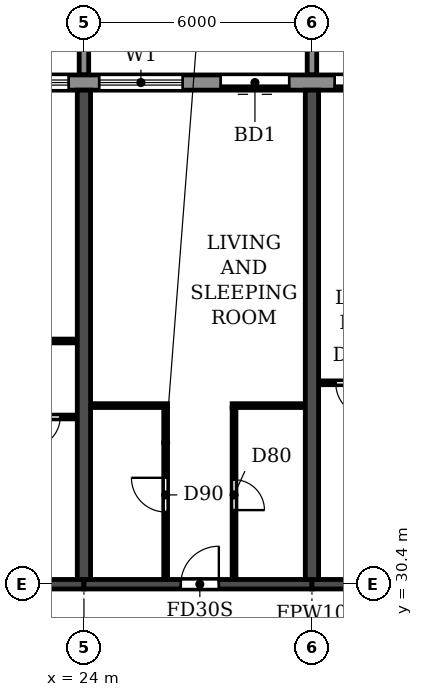
"""IFC4 building model, lengths in metres.
Left out: names, types, materials, properties, quantities, classifications, styles, units other than length and angle.
Written with IfcOpenShell. Run it as: python <this file> out.ifc"""

import sys

from ifc_helpers import new_model, si_unit, direction, frame, frame_2d, origin, place, context, subcontext, project, spatial, polyline, rectangle, outline, extrude, source, transform, mapped, element, fill, save


model = new_model("IFC4")
c1 = context("Model", 3, precision=1e-05, world=origin(), true_north=direction((0.0, 1.0)))
c2 = subcontext(c1, "Body", "Model", "MODEL_VIEW")
j1 = project(units=[si_unit("LENGTHUNIT", "METRE"), si_unit("PLANEANGLEUNIT", "RADIAN")], contexts=[c1])
p1 = place(None, origin())
s1 = spatial("IfcSite", under=j1, at=p1, CompositionType="ELEMENT")
p2 = place(p1, origin())
s2 = spatial("IfcBuilding", under=s1, at=p2, CompositionType="ELEMENT")
p3 = place(p2, frame((0.0, 0.0, 109.2)))
s3 = spatial("IfcBuildingStorey", under=s2, at=p3, CompositionType="ELEMENT", Elevation=109.2)
for number, where, z_axis, x_axis in (
    (1, (24.0, 30.525, 0.0), (0.0, 0.0, 1.0), (0.0, 1.0, 0.0)),
    (2, (30.0, 30.525, 0.0), (0.0, 0.0, 1.0), (0.0, 1.0, 0.0)),
):
    element("IfcWall", number, at=place(p3, frame(where, z_axis=z_axis, x_axis=x_axis)), inside=s3, PredefinedType="SHEAR", context=c2, shape_type="SweptSolid", body=[
        extrude(rectangle(XDim=12.875, YDim=0.35, at=frame_2d((6.438, 0.0))), origin(), (0.0, 0.0, 1.0), 3.06),
    ])
p4 = place(p3, frame((18.0, 30.4, 0.0), z_axis=(0.0, 0.0, 1.0), x_axis=(1.0, 0.0, 0.0)))
e3 = element("IfcWall", 3, at=p4, inside=s3, PredefinedType="SHEAR", context=c2, shape_type="SweptSolid", body=[
    extrude(rectangle(XDim=6.0, YDim=0.25, at=frame_2d((3.0, 0.0))), origin(), (0.0, 0.0, 1.0), 2.46),
])
p5 = place(p4, frame((2.55, 0.0, 0.0)))
e4 = element("IfcOpeningElement", 4, at=p5, cuts=e3, PredefinedType="OPENING", context=c2, shape_type="SweptSolid", body=[
    extrude(rectangle(XDim=1.0, YDim=2.1, at=frame_2d((0.5, 1.05))), frame((0.0, 0.135, 0.0), z_axis=(0.0, -1.0, 0.0), x_axis=(1.0, 0.0, 0.0)), (0.0, 0.0, 1.0), 0.27),
])
p6 = place(p3, frame((24.0, 30.4, 0.0), z_axis=(0.0, 0.0, 1.0), x_axis=(1.0, 0.0, 0.0)))
e5 = element("IfcWall", 5, at=p6, inside=s3, PredefinedType="SHEAR", context=c2, shape_type="SweptSolid", body=[
    extrude(rectangle(XDim=6.0, YDim=0.25, at=frame_2d((3.0, 0.0))), origin(), (0.0, 0.0, 1.0), 2.46),
])
p7 = place(p6, frame((2.55, 0.0, 0.0)))
e6 = element("IfcOpeningElement", 6, at=p7, cuts=e5, PredefinedType="OPENING", context=c2, shape_type="SweptSolid", body=[
    extrude(rectangle(XDim=1.0, YDim=2.1, at=frame_2d((0.5, 1.05))), frame((0.0, 0.135, 0.0), z_axis=(0.0, -1.0, 0.0), x_axis=(1.0, 0.0, 0.0)), (0.0, 0.0, 1.0), 0.27),
])
p8 = place(p3, frame((30.0, 30.4, 0.0), z_axis=(0.0, 0.0, 1.0), x_axis=(1.0, 0.0, 0.0)))
e7 = element("IfcWall", 7, at=p8, inside=s3, PredefinedType="SHEAR", context=c2, shape_type="SweptSolid", body=[
    extrude(rectangle(XDim=6.0, YDim=0.25, at=frame_2d((3.0, 0.0))), origin(), (0.0, 0.0, 1.0), 2.46),
])
p9 = place(p8, frame((2.55, 0.0, 0.0)))
e8 = element("IfcOpeningElement", 8, at=p9, cuts=e7, PredefinedType="OPENING", context=c2, shape_type="SweptSolid", body=[
    extrude(rectangle(XDim=1.0, YDim=2.1, at=frame_2d((0.5, 1.05))), frame((0.0, 0.135, 0.0), z_axis=(0.0, -1.0, 0.0), x_axis=(1.0, 0.0, 0.0)), (0.0, 0.0, 1.0), 0.27),
])
p10 = place(p3, frame((85.317, 43.6, 0.0), z_axis=(0.0, 0.0, 1.0), x_axis=(-1.0, 0.0, 0.0)))
e9 = element("IfcWall", 9, at=p10, inside=s3, PredefinedType="STANDARD", context=c2, shape_type="SweptSolid", body=[
    extrude(rectangle(XDim=68.634, YDim=0.4, at=frame_2d((34.317, 0.0))), origin(), (0.0, 0.0, 1.0), 3.06),
])
p11 = place(p10, frame((64.917, 0.0, 0.0)))
e10 = element("IfcOpeningElement", 10, at=p11, cuts=e9, PredefinedType="OPENING", context=c2, shape_type="SweptSolid", body=[
    extrude(rectangle(XDim=1.8, YDim=2.4, at=frame_2d((0.9, 1.2))), frame((0.0, 0.21, 0.0), z_axis=(0.0, -1.0, 0.0), x_axis=(1.0, 0.0, 0.0)), (0.0, 0.0, 1.0), 0.42),
])
p12 = place(p10, frame((61.717, 0.0, 0.9)))
e11 = element("IfcOpeningElement", 11, at=p12, cuts=e9, PredefinedType="OPENING", context=c2, shape_type="SweptSolid", body=[
    extrude(rectangle(XDim=2.2, YDim=1.5, at=frame_2d((1.1, 0.75))), frame((0.0, 0.21, 0.0), z_axis=(0.0, -1.0, 0.0), x_axis=(1.0, 0.0, 0.0)), (0.0, 0.0, 1.0), 0.42),
])
p13 = place(p10, frame((58.717, 0.0, 0.9)))
e12 = element("IfcOpeningElement", 12, at=p13, cuts=e9, PredefinedType="OPENING", context=c2, shape_type="SweptSolid", body=[
    extrude(rectangle(XDim=2.2, YDim=1.5, at=frame_2d((1.1, 0.75))), frame((0.0, 0.21, 0.0), z_axis=(0.0, -1.0, 0.0), x_axis=(1.0, 0.0, 0.0)), (0.0, 0.0, 1.0), 0.42),
])
p14 = place(p10, frame((55.917, 0.0, 0.0)))
e13 = element("IfcOpeningElement", 13, at=p14, cuts=e9, PredefinedType="OPENING", context=c2, shape_type="SweptSolid", body=[
    extrude(rectangle(XDim=1.8, YDim=2.4, at=frame_2d((0.9, 1.2))), frame((0.0, 0.21, 0.0), z_axis=(0.0, -1.0, 0.0), x_axis=(1.0, 0.0, 0.0)), (0.0, 0.0, 1.0), 0.42),
])
p15 = place(p10, frame((52.917, 0.0, 0.0)))
e14 = element("IfcOpeningElement", 14, at=p15, cuts=e9, PredefinedType="OPENING", context=c2, shape_type="SweptSolid", body=[
    extrude(rectangle(XDim=1.8, YDim=2.4, at=frame_2d((0.9, 1.2))), frame((0.0, 0.21, 0.0), z_axis=(0.0, -1.0, 0.0), x_axis=(1.0, 0.0, 0.0)), (0.0, 0.0, 1.0), 0.42),
])
p16 = place(p10, frame((49.717, 0.0, 0.9)))
e15 = element("IfcOpeningElement", 15, at=p16, cuts=e9, PredefinedType="OPENING", context=c2, shape_type="SweptSolid", body=[
    extrude(rectangle(XDim=2.2, YDim=1.5, at=frame_2d((1.1, 0.75))), frame((0.0, 0.21, 0.0), z_axis=(0.0, -1.0, 0.0), x_axis=(1.0, 0.0, 0.0)), (0.0, 0.0, 1.0), 0.42),
])
p17 = place(p10, frame((46.717, 0.0, 0.9)))
e16 = element("IfcOpeningElement", 16, at=p17, cuts=e9, PredefinedType="OPENING", context=c2, shape_type="SweptSolid", body=[
    extrude(rectangle(XDim=2.2, YDim=1.5, at=frame_2d((1.1, 0.75))), frame((0.0, 0.21, 0.0), z_axis=(0.0, -1.0, 0.0), x_axis=(1.0, 0.0, 0.0)), (0.0, 0.0, 1.0), 0.42),
])
p18 = place(p10, frame((43.917, 0.0, 0.0)))
e17 = element("IfcOpeningElement", 17, at=p18, cuts=e9, PredefinedType="OPENING", context=c2, shape_type="SweptSolid", body=[
    extrude(rectangle(XDim=1.8, YDim=2.4, at=frame_2d((0.9, 1.2))), frame((0.0, 0.21, 0.0), z_axis=(0.0, -1.0, 0.0), x_axis=(1.0, 0.0, 0.0)), (0.0, 0.0, 1.0), 0.42),
])
p19 = place(p10, frame((40.717, 0.0, 0.9)))
e18 = element("IfcOpeningElement", 18, at=p19, cuts=e9, PredefinedType="OPENING", context=c2, shape_type="SweptSolid", body=[
    extrude(rectangle(XDim=2.2, YDim=1.5, at=frame_2d((1.1, 0.75))), frame((0.0, 0.21, 0.0), z_axis=(0.0, -1.0, 0.0), x_axis=(1.0, 0.0, 0.0)), (0.0, 0.0, 1.0), 0.42),
])
p20 = place(p10, frame((37.717, 0.0, 0.9)))
e19 = element("IfcOpeningElement", 19, at=p20, cuts=e9, PredefinedType="OPENING", context=c2, shape_type="SweptSolid", body=[
    extrude(rectangle(XDim=2.2, YDim=1.5, at=frame_2d((1.1, 0.75))), frame((0.0, 0.21, 0.0), z_axis=(0.0, -1.0, 0.0), x_axis=(1.0, 0.0, 0.0)), (0.0, 0.0, 1.0), 0.42),
])
p21 = place(p10, frame((34.917, 0.0, 0.0)))
e20 = element("IfcOpeningElement", 20, at=p21, cuts=e9, PredefinedType="OPENING", context=c2, shape_type="SweptSolid", body=[
    extrude(rectangle(XDim=1.8, YDim=2.4, at=frame_2d((0.9, 1.2))), frame((0.0, 0.21, 0.0), z_axis=(0.0, -1.0, 0.0), x_axis=(1.0, 0.0, 0.0)), (0.0, 0.0, 1.0), 0.42),
])
p22 = place(p10, frame((31.717, 0.0, 0.9)))
e21 = element("IfcOpeningElement", 21, at=p22, cuts=e9, PredefinedType="OPENING", context=c2, shape_type="SweptSolid", body=[
    extrude(rectangle(XDim=2.2, YDim=1.5, at=frame_2d((1.1, 0.75))), frame((0.0, 0.21, 0.0), z_axis=(0.0, -1.0, 0.0), x_axis=(1.0, 0.0, 0.0)), (0.0, 0.0, 1.0), 0.42),
])
p23 = place(p10, frame((28.917, 0.0, 0.0)))
e22 = element("IfcOpeningElement", 22, at=p23, cuts=e9, PredefinedType="OPENING", context=c2, shape_type="SweptSolid", body=[
    extrude(rectangle(XDim=1.8, YDim=2.4, at=frame_2d((0.9, 1.2))), frame((0.0, 0.21, 0.0), z_axis=(0.0, -1.0, 0.0), x_axis=(1.0, 0.0, 0.0)), (0.0, 0.0, 1.0), 0.42),
])
p24 = place(p10, frame((25.717, 0.0, 0.9)))
e23 = element("IfcOpeningElement", 23, at=p24, cuts=e9, PredefinedType="OPENING", context=c2, shape_type="SweptSolid", body=[
    extrude(rectangle(XDim=2.2, YDim=1.5, at=frame_2d((1.1, 0.75))), frame((0.0, 0.21, 0.0), z_axis=(0.0, -1.0, 0.0), x_axis=(1.0, 0.0, 0.0)), (0.0, 0.0, 1.0), 0.42),
])
p25 = place(p10, frame((22.717, 0.0, 0.9)))
e24 = element("IfcOpeningElement", 24, at=p25, cuts=e9, PredefinedType="OPENING", context=c2, shape_type="SweptSolid", body=[
    extrude(rectangle(XDim=2.2, YDim=1.5, at=frame_2d((1.1, 0.75))), frame((0.0, 0.21, 0.0), z_axis=(0.0, -1.0, 0.0), x_axis=(1.0, 0.0, 0.0)), (0.0, 0.0, 1.0), 0.42),
])
p26 = place(p10, frame((19.917, 0.0, 0.0)))
e25 = element("IfcOpeningElement", 25, at=p26, cuts=e9, PredefinedType="OPENING", context=c2, shape_type="SweptSolid", body=[
    extrude(rectangle(XDim=1.8, YDim=2.4, at=frame_2d((0.9, 1.2))), frame((0.0, 0.21, 0.0), z_axis=(0.0, -1.0, 0.0), x_axis=(1.0, 0.0, 0.0)), (0.0, 0.0, 1.0), 0.42),
])
p27 = place(p10, frame((16.717, 0.0, 0.9)))
e26 = element("IfcOpeningElement", 26, at=p27, cuts=e9, PredefinedType="OPENING", context=c2, shape_type="SweptSolid", body=[
    extrude(rectangle(XDim=2.2, YDim=1.5, at=frame_2d((1.1, 0.75))), frame((0.0, 0.21, 0.0), z_axis=(0.0, -1.0, 0.0), x_axis=(1.0, 0.0, 0.0)), (0.0, 0.0, 1.0), 0.42),
])
p28 = place(p10, frame((13.917, 0.0, 0.0)))
e27 = element("IfcOpeningElement", 27, at=p28, cuts=e9, PredefinedType="OPENING", context=c2, shape_type="SweptSolid", body=[
    extrude(rectangle(XDim=1.8, YDim=2.4, at=frame_2d((0.9, 1.2))), frame((0.0, 0.21, 0.0), z_axis=(0.0, -1.0, 0.0), x_axis=(1.0, 0.0, 0.0)), (0.0, 0.0, 1.0), 0.42),
])
p29 = place(p10, frame((10.717, 0.0, 0.9)))
e28 = element("IfcOpeningElement", 28, at=p29, cuts=e9, PredefinedType="OPENING", context=c2, shape_type="SweptSolid", body=[
    extrude(rectangle(XDim=2.2, YDim=1.5, at=frame_2d((1.1, 0.75))), frame((0.0, 0.21, 0.0), z_axis=(0.0, -1.0, 0.0), x_axis=(1.0, 0.0, 0.0)), (0.0, 0.0, 1.0), 0.42),
])
p30 = place(p10, frame((7.717, 0.0, 0.9)))
e29 = element("IfcOpeningElement", 29, at=p30, cuts=e9, PredefinedType="OPENING", context=c2, shape_type="SweptSolid", body=[
    extrude(rectangle(XDim=2.2, YDim=1.5, at=frame_2d((1.1, 0.75))), frame((0.0, 0.21, 0.0), z_axis=(0.0, -1.0, 0.0), x_axis=(1.0, 0.0, 0.0)), (0.0, 0.0, 1.0), 0.42),
])
p31 = place(p10, frame((4.917, 0.0, 0.0)))
e30 = element("IfcOpeningElement", 30, at=p31, cuts=e9, PredefinedType="OPENING", context=c2, shape_type="SweptSolid", body=[
    extrude(rectangle(XDim=1.8, YDim=2.4, at=frame_2d((0.9, 1.2))), frame((0.0, 0.21, 0.0), z_axis=(0.0, -1.0, 0.0), x_axis=(1.0, 0.0, 0.0)), (0.0, 0.0, 1.0), 0.42),
])
p32 = place(p10, frame((1.717, 0.0, 0.9)))
e31 = element("IfcOpeningElement", 31, at=p32, cuts=e9, PredefinedType="OPENING", context=c2, shape_type="SweptSolid", body=[
    extrude(rectangle(XDim=2.2, YDim=1.5, at=frame_2d((1.1, 0.75))), frame((0.0, 0.21, 0.0), z_axis=(0.0, -1.0, 0.0), x_axis=(1.0, 0.0, 0.0)), (0.0, 0.0, 1.0), 0.42),
])
m1 = source(origin(), c2, "Body", "SweptSolid", [
    extrude(outline(polyline([(0.0, 0.0), (0.25, 0.0), (0.25, 3.1), (0.0, 3.1), (0.0, 0.0)])), origin(), (0.0, 0.0, 1.0), 3.1),
])
for number, where in (
    (32, (23.875, 43.8, 0.0)),
    (33, (29.875, 43.8, 0.0)),
):
    element("IfcWall", number, at=place(p3, frame(where)), inside=s3, PredefinedType="STANDARD", context=c2, shape_type="MappedRepresentation", body=[
        mapped(m1, transform((0.0, 0.0, 0.0))),
    ])
p33 = place(p3, frame((21.9, 34.8, 0.0), z_axis=(0.0, 0.0, 1.0), x_axis=(1.0, 0.0, 0.0)))
e34 = element("IfcWall", 34, at=p33, inside=s3, PredefinedType="PARTITIONING", context=c2, shape_type="SweptSolid", body=[
    extrude(rectangle(XDim=1.915, YDim=0.1, at=frame_2d((0.958, 0.0))), origin(), (0.0, 0.0, 1.0), 3.06),
])
p34 = place(p33, frame((0.675, 0.0, 0.0)))
e35 = element("IfcOpeningElement", 35, at=p34, cuts=e34, PredefinedType="OPENING", context=c2, shape_type="SweptSolid", body=[
    extrude(rectangle(XDim=0.8, YDim=2.1, at=frame_2d((0.4, 1.05))), frame((0.0, 0.06, 0.0), z_axis=(0.0, -1.0, 0.0), x_axis=(1.0, 0.0, 0.0)), (0.0, 0.0, 1.0), 0.12),
])
p35 = place(p3, frame((24.185, 35.1, 0.0), z_axis=(0.0, 0.0, 1.0), x_axis=(1.0, 0.0, 0.0)))
e36 = element("IfcWall", 36, at=p35, inside=s3, PredefinedType="PARTITIONING", context=c2, shape_type="SweptSolid", body=[
    extrude(rectangle(XDim=2.015, YDim=0.1, at=frame_2d((1.007, 0.0))), origin(), (0.0, 0.0, 1.0), 3.06),
])
p36 = place(p3, frame((27.9, 35.1, 0.0), z_axis=(0.0, 0.0, 1.0), x_axis=(1.0, 0.0, 0.0)))
e37 = element("IfcWall", 37, at=p36, inside=s3, PredefinedType="PARTITIONING", context=c2, shape_type="SweptSolid", body=[
    extrude(rectangle(XDim=1.915, YDim=0.1, at=frame_2d((0.958, 0.0))), origin(), (0.0, 0.0, 1.0), 3.06),
])
p37 = place(p3, frame((30.185, 35.7, 0.0), z_axis=(0.0, 0.0, 1.0), x_axis=(1.0, 0.0, 0.0)))
e38 = element("IfcWall", 38, at=p37, inside=s3, PredefinedType="PARTITIONING", context=c2, shape_type="SweptSolid", body=[
    extrude(rectangle(XDim=2.015, YDim=0.1, at=frame_2d((1.007, 0.0))), origin(), (0.0, 0.0, 1.0), 3.06),
])
p38 = place(p37, frame((0.44, 0.0, 0.0)))
e39 = element("IfcOpeningElement", 39, at=p38, cuts=e38, PredefinedType="OPENING", context=c2, shape_type="SweptSolid", body=[
    extrude(rectangle(XDim=0.9, YDim=2.1, at=frame_2d((0.45, 1.05))), frame((0.0, 0.06, 0.0), z_axis=(0.0, -1.0, 0.0), x_axis=(1.0, 0.0, 0.0)), (0.0, 0.0, 1.0), 0.12),
])
p39 = place(p3, frame((20.95, 36.8, 0.0), z_axis=(0.0, 0.0, 1.0), x_axis=(1.0, 0.0, 0.0)))
e40 = element("IfcWall", 40, at=p39, inside=s3, PredefinedType="PARTITIONING", context=c2, shape_type="SweptSolid", body=[
    extrude(rectangle(XDim=2.865, YDim=0.1, at=frame_2d((1.433, 0.0))), origin(), (0.0, 0.0, 1.0), 3.06),
])
p40 = place(p39, frame((0.55, 0.0, 0.0)))
e41 = element("IfcOpeningElement", 41, at=p40, cuts=e40, PredefinedType="OPENING", context=c2, shape_type="SweptSolid", body=[
    extrude(rectangle(XDim=0.9, YDim=2.1, at=frame_2d((0.45, 1.05))), frame((0.0, 0.06, 0.0), z_axis=(0.0, -1.0, 0.0), x_axis=(1.0, 0.0, 0.0)), (0.0, 0.0, 1.0), 0.12),
])
p41 = place(p3, frame((26.15, 30.535, 0.0), z_axis=(0.0, 0.0, 1.0), x_axis=(0.0, 1.0, 0.0)))
e42 = element("IfcWall", 42, at=p41, inside=s3, PredefinedType="PARTITIONING", context=c2, shape_type="SweptSolid", body=[
    extrude(rectangle(XDim=4.515, YDim=0.1, at=frame_2d((2.258, 0.0))), origin(), (0.0, 0.0, 1.0), 3.06),
])
p42 = place(p41, frame((1.765, 0.0, 0.0)))
e43 = element("IfcOpeningElement", 43, at=p42, cuts=e42, PredefinedType="OPENING", context=c2, shape_type="SweptSolid", body=[
    extrude(rectangle(XDim=0.9, YDim=2.1, at=frame_2d((0.45, 1.05))), frame((0.0, 0.06, 0.0), z_axis=(0.0, -1.0, 0.0), x_axis=(1.0, 0.0, 0.0)), (0.0, 0.0, 1.0), 0.12),
])
p43 = place(p3, frame((27.95, 30.535, 0.0), z_axis=(0.0, 0.0, 1.0), x_axis=(0.0, 1.0, 0.0)))
e44 = element("IfcWall", 44, at=p43, inside=s3, PredefinedType="PARTITIONING", context=c2, shape_type="SweptSolid", body=[
    extrude(rectangle(XDim=4.515, YDim=0.1, at=frame_2d((2.258, 0.0))), origin(), (0.0, 0.0, 1.0), 3.06),
])
p44 = place(p43, frame((1.815, 0.0, 0.0)))
e45 = element("IfcOpeningElement", 45, at=p44, cuts=e44, PredefinedType="OPENING", context=c2, shape_type="SweptSolid", body=[
    extrude(rectangle(XDim=0.8, YDim=2.1, at=frame_2d((0.4, 1.05))), frame((0.0, 0.06, 0.0), z_axis=(0.0, -1.0, 0.0), x_axis=(1.0, 0.0, 0.0)), (0.0, 0.0, 1.0), 0.12),
])
p45 = place(p12, origin())
e46 = element("IfcWindow", 46, at=p45, inside=s3, PartitioningType="DOUBLE_PANEL_HORIZONTAL", PredefinedType="WINDOW", context=c2, shape_type="SweptSolid", body=[
    extrude(rectangle(XDim=2.2, YDim=1.5, at=frame_2d((1.1, 0.75))), frame((0.0, 0.03, 0.0), z_axis=(0.0, -1.0, 0.0), x_axis=(1.0, 0.0, 0.0)), (0.0, 0.0, 1.0), 0.06),
])
fill(e11, e46)
p46 = place(p13, origin())
e47 = element("IfcWindow", 47, at=p46, inside=s3, PartitioningType="DOUBLE_PANEL_HORIZONTAL", PredefinedType="WINDOW", context=c2, shape_type="SweptSolid", body=[
    extrude(rectangle(XDim=2.2, YDim=1.5, at=frame_2d((1.1, 0.75))), frame((0.0, 0.03, 0.0), z_axis=(0.0, -1.0, 0.0), x_axis=(1.0, 0.0, 0.0)), (0.0, 0.0, 1.0), 0.06),
])
fill(e12, e47)
p47 = place(p14, origin())
e48 = element("IfcDoor", 48, at=p47, inside=s3, OperationType="DOUBLE_DOOR_SLIDING", PredefinedType="DOOR", context=c2, shape_type="SweptSolid", body=[
    extrude(rectangle(XDim=1.8, YDim=2.4, at=frame_2d((0.9, 1.2))), frame((0.0, 0.025, 0.0), z_axis=(0.0, -1.0, 0.0), x_axis=(1.0, 0.0, 0.0)), (0.0, 0.0, 1.0), 0.05),
])
fill(e13, e48)
p48 = place(p15, origin())
e49 = element("IfcDoor", 49, at=p48, inside=s3, OperationType="DOUBLE_DOOR_SLIDING", PredefinedType="DOOR", context=c2, shape_type="SweptSolid", body=[
    extrude(rectangle(XDim=1.8, YDim=2.4, at=frame_2d((0.9, 1.2))), frame((0.0, 0.025, 0.0), z_axis=(0.0, -1.0, 0.0), x_axis=(1.0, 0.0, 0.0)), (0.0, 0.0, 1.0), 0.05),
])
fill(e14, e49)
p49 = place(p34, frame((0.8, 0.0, 0.0), z_axis=(0.0, 0.0, 1.0), x_axis=(-1.0, 0.0, 0.0)))
e50 = element("IfcDoor", 50, at=p49, inside=s3, OperationType="SINGLE_SWING_RIGHT", PredefinedType="DOOR", context=c2, shape_type="SweptSolid", body=[
    extrude(rectangle(XDim=0.8, YDim=2.1, at=frame_2d((0.4, 1.05))), frame((0.0, 0.025, 0.0), z_axis=(0.0, -1.0, 0.0), x_axis=(1.0, 0.0, 0.0)), (0.0, 0.0, 1.0), 0.05),
])
fill(e35, e50)
p50 = place(p42, origin())
e51 = element("IfcDoor", 51, at=p50, inside=s3, OperationType="SINGLE_SWING_RIGHT", PredefinedType="DOOR", context=c2, shape_type="SweptSolid", body=[
    extrude(rectangle(XDim=0.9, YDim=2.1, at=frame_2d((0.45, 1.05))), frame((0.0, 0.025, 0.0), z_axis=(0.0, -1.0, 0.0), x_axis=(1.0, 0.0, 0.0)), (0.0, 0.0, 1.0), 0.05),
])
fill(e43, e51)
p51 = place(p7, origin())
e52 = element("IfcDoor", 52, at=p51, inside=s3, OperationType="SINGLE_SWING_RIGHT", PredefinedType="DOOR", context=c2, shape_type="SweptSolid", body=[
    extrude(rectangle(XDim=1.0, YDim=2.1, at=frame_2d((0.5, 1.05))), frame((0.0, 0.025, 0.0), z_axis=(0.0, -1.0, 0.0), x_axis=(1.0, 0.0, 0.0)), (0.0, 0.0, 1.0), 0.05),
])
fill(e6, e52)
p52 = place(p44, frame((0.8, 0.0, 0.0), z_axis=(0.0, 0.0, 1.0), x_axis=(-1.0, 0.0, 0.0)))
e53 = element("IfcDoor", 53, at=p52, inside=s3, OperationType="SINGLE_SWING_RIGHT", PredefinedType="DOOR", context=c2, shape_type="SweptSolid", body=[
    extrude(rectangle(XDim=0.8, YDim=2.1, at=frame_2d((0.4, 1.05))), frame((0.0, 0.025, 0.0), z_axis=(0.0, -1.0, 0.0), x_axis=(1.0, 0.0, 0.0)), (0.0, 0.0, 1.0), 0.05),
])
fill(e45, e53)
p53 = place(p38, frame((0.9, 0.0, 0.0), z_axis=(0.0, 0.0, 1.0), x_axis=(-1.0, 0.0, 0.0)))
e54 = element("IfcDoor", 54, at=p53, inside=s3, OperationType="SINGLE_SWING_LEFT", PredefinedType="DOOR", context=c2, shape_type="SweptSolid", body=[
    extrude(rectangle(XDim=0.9, YDim=2.1, at=frame_2d((0.45, 1.05))), frame((0.0, 0.025, 0.0), z_axis=(0.0, -1.0, 0.0), x_axis=(1.0, 0.0, 0.0)), (0.0, 0.0, 1.0), 0.05),
])
fill(e39, e54)
save(model, sys.argv[1])
